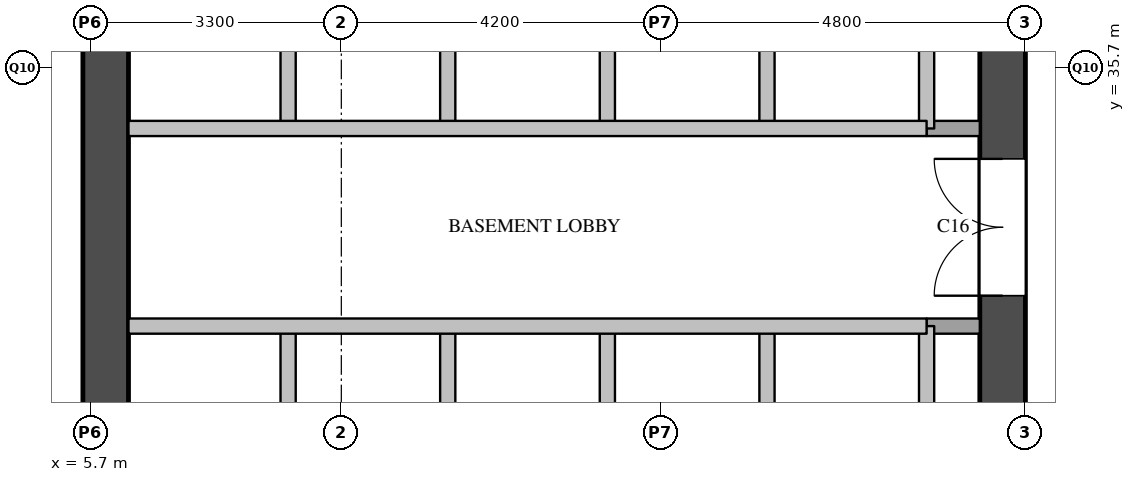
"""IFC4 building model, lengths in metres.
Left out: names, types, materials, properties, quantities, classifications, styles, units other than length and angle.
Written with IfcOpenShell. Run it as: python <this file> out.ifc"""

import sys

from ifc_helpers import new_model, si_unit, direction, frame, frame_2d, origin, place, context, subcontext, project, spatial, rectangle, extrude, element, fill, save


model = new_model("IFC4")
c1 = context("Model", 3, precision=1e-05, world=origin(), true_north=direction((0.0, 1.0)))
c2 = subcontext(c1, "Body", "Model", "MODEL_VIEW")
j1 = project(units=[si_unit("LENGTHUNIT", "METRE"), si_unit("PLANEANGLEUNIT", "RADIAN")], contexts=[c1])
p1 = place(None, origin())
s1 = spatial("IfcSite", under=j1, at=p1, CompositionType="ELEMENT")
p2 = place(p1, origin())
s2 = spatial("IfcBuilding", under=s1, at=p2, CompositionType="ELEMENT")
p3 = place(p2, frame((0.0, 0.0, -6.0)))
s3 = spatial("IfcBuildingStorey", under=s2, at=p3, CompositionType="ELEMENT", Elevation=-6.0)
p4 = place(p3, frame((5.9, 29.1, 0.0), z_axis=(0.0, 0.0, 1.0), x_axis=(0.0, 1.0, 0.0)))
e1 = element("IfcWall", 1, at=p4, inside=s3, PredefinedType="SHEAR", context=c2, shape_type="SweptSolid", body=[
    extrude(rectangle(XDim=20.3, YDim=0.6, at=frame_2d((10.15, 0.0))), origin(), (0.0, 0.0, 1.0), 5.59),
])
p5 = place(p4, frame((16.4, 0.0, 0.0)))
e2 = element("IfcOpeningElement", 2, at=p5, cuts=e1, PredefinedType="OPENING", context=c2, shape_type="SweptSolid", body=[
    extrude(rectangle(XDim=1.0, YDim=2.1, at=frame_2d((0.5, 1.05))), frame((0.0, 0.31, 0.0), z_axis=(0.0, -1.0, 0.0), x_axis=(1.0, 0.0, 0.0)), (0.0, 0.0, 1.0), 0.62),
])
p6 = place(p3, frame((17.7, 29.1, 0.0), z_axis=(0.0, 0.0, 1.0), x_axis=(0.0, 1.0, 0.0)))
e3 = element("IfcWall", 3, at=p6, inside=s3, PredefinedType="SHEAR", context=c2, shape_type="SweptSolid", body=[
    extrude(rectangle(XDim=20.3, YDim=0.6, at=frame_2d((10.15, 0.0))), origin(), (0.0, 0.0, 1.0), 5.59),
])
p7 = place(p6, frame((1.25, 0.0, 0.0)))
e4 = element("IfcOpeningElement", 4, at=p7, cuts=e3, PredefinedType="OPENING", context=c2, shape_type="SweptSolid", body=[
    extrude(rectangle(XDim=0.7, YDim=2.1, at=frame_2d((0.35, 1.05))), frame((0.0, 0.31, 0.0), z_axis=(0.0, -1.0, 0.0), x_axis=(1.0, 0.0, 0.0)), (0.0, 0.0, 1.0), 0.62),
])
p8 = place(p6, frame((7.05, 0.0, 0.0)))
e5 = element("IfcOpeningElement", 5, at=p8, cuts=e3, PredefinedType="OPENING", context=c2, shape_type="SweptSolid", body=[
    extrude(rectangle(XDim=0.7, YDim=2.1, at=frame_2d((0.35, 1.05))), frame((0.0, 0.31, 0.0), z_axis=(0.0, -1.0, 0.0), x_axis=(1.0, 0.0, 0.0)), (0.0, 0.0, 1.0), 0.62),
])
p9 = place(p6, frame((3.6, 0.0, 0.0)))
e6 = element("IfcOpeningElement", 6, at=p9, cuts=e3, PredefinedType="OPENING", context=c2, shape_type="SweptSolid", body=[
    extrude(rectangle(XDim=1.8, YDim=2.1, at=frame_2d((0.9, 1.05))), frame((0.0, 0.31, 0.0), z_axis=(0.0, -1.0, 0.0), x_axis=(1.0, 0.0, 0.0)), (0.0, 0.0, 1.0), 0.62),
])
p10 = place(p6, frame((16.4, 0.0, 0.0)))
e7 = element("IfcOpeningElement", 7, at=p10, cuts=e3, PredefinedType="OPENING", context=c2, shape_type="SweptSolid", body=[
    extrude(rectangle(XDim=1.0, YDim=2.1, at=frame_2d((0.5, 1.05))), frame((0.0, 0.31, 0.0), z_axis=(0.0, -1.0, 0.0), x_axis=(1.0, 0.0, 0.0)), (0.0, 0.0, 1.0), 0.62),
])
p11 = place(p3, frame((8.3, 29.1, 0.0), z_axis=(0.0, 0.0, 1.0), x_axis=(0.0, 1.0, 0.0)))
e8 = element("IfcWall", 8, at=p11, inside=s3, PredefinedType="SOLIDWALL", context=c2, shape_type="SweptSolid", body=[
    extrude(rectangle(XDim=3.2, YDim=0.2, at=frame_2d((1.6, 0.0))), origin(), (0.0, 0.0, 1.0), 5.59),
])
p12 = place(p3, frame((8.3, 34.9, 0.0), z_axis=(0.0, 0.0, 1.0), x_axis=(0.0, 1.0, 0.0)))
e9 = element("IfcWall", 9, at=p12, inside=s3, PredefinedType="SOLIDWALL", context=c2, shape_type="SweptSolid", body=[
    extrude(rectangle(XDim=3.2, YDim=0.2, at=frame_2d((1.6, 0.0))), origin(), (0.0, 0.0, 1.0), 5.59),
])
p13 = place(p3, frame((10.4, 29.1, 0.0), z_axis=(0.0, 0.0, 1.0), x_axis=(0.0, 1.0, 0.0)))
e10 = element("IfcWall", 10, at=p13, inside=s3, PredefinedType="SOLIDWALL", context=c2, shape_type="SweptSolid", body=[
    extrude(rectangle(XDim=3.2, YDim=0.2, at=frame_2d((1.6, 0.0))), origin(), (0.0, 0.0, 1.0), 5.59),
])
p14 = place(p3, frame((10.4, 34.9, 0.0), z_axis=(0.0, 0.0, 1.0), x_axis=(0.0, 1.0, 0.0)))
e11 = element("IfcWall", 11, at=p14, inside=s3, PredefinedType="SOLIDWALL", context=c2, shape_type="SweptSolid", body=[
    extrude(rectangle(XDim=3.2, YDim=0.2, at=frame_2d((1.6, 0.0))), origin(), (0.0, 0.0, 1.0), 5.59),
])
p15 = place(p3, frame((12.5, 29.1, 0.0), z_axis=(0.0, 0.0, 1.0), x_axis=(0.0, 1.0, 0.0)))
e12 = element("IfcWall", 12, at=p15, inside=s3, PredefinedType="SOLIDWALL", context=c2, shape_type="SweptSolid", body=[
    extrude(rectangle(XDim=3.2, YDim=0.2, at=frame_2d((1.6, 0.0))), origin(), (0.0, 0.0, 1.0), 5.59),
])
p16 = place(p3, frame((12.5, 34.9, 0.0), z_axis=(0.0, 0.0, 1.0), x_axis=(0.0, 1.0, 0.0)))
e13 = element("IfcWall", 13, at=p16, inside=s3, PredefinedType="SOLIDWALL", context=c2, shape_type="SweptSolid", body=[
    extrude(rectangle(XDim=3.2, YDim=0.2, at=frame_2d((1.6, 0.0))), origin(), (0.0, 0.0, 1.0), 5.59),
])
p17 = place(p3, frame((14.6, 29.1, 0.0), z_axis=(0.0, 0.0, 1.0), x_axis=(0.0, 1.0, 0.0)))
e14 = element("IfcWall", 14, at=p17, inside=s3, PredefinedType="SOLIDWALL", context=c2, shape_type="SweptSolid", body=[
    extrude(rectangle(XDim=3.2, YDim=0.2, at=frame_2d((1.6, 0.0))), origin(), (0.0, 0.0, 1.0), 5.59),
])
p18 = place(p3, frame((14.6, 34.9, 0.0), z_axis=(0.0, 0.0, 1.0), x_axis=(0.0, 1.0, 0.0)))
e15 = element("IfcWall", 15, at=p18, inside=s3, PredefinedType="SOLIDWALL", context=c2, shape_type="SweptSolid", body=[
    extrude(rectangle(XDim=3.2, YDim=0.2, at=frame_2d((1.6, 0.0))), origin(), (0.0, 0.0, 1.0), 5.59),
])
p19 = place(p3, frame((16.7, 29.1, 0.0), z_axis=(0.0, 0.0, 1.0), x_axis=(0.0, 1.0, 0.0)))
e16 = element("IfcWall", 16, at=p19, inside=s3, PredefinedType="SOLIDWALL", context=c2, shape_type="SweptSolid", body=[
    extrude(rectangle(XDim=3.2, YDim=0.2, at=frame_2d((1.6, 0.0))), origin(), (0.0, 0.0, 1.0), 5.59),
])
p20 = place(p3, frame((16.7, 34.9, 0.0), z_axis=(0.0, 0.0, 1.0), x_axis=(0.0, 1.0, 0.0)))
e17 = element("IfcWall", 17, at=p20, inside=s3, PredefinedType="SOLIDWALL", context=c2, shape_type="SweptSolid", body=[
    extrude(rectangle(XDim=3.2, YDim=0.2, at=frame_2d((1.6, 0.0))), origin(), (0.0, 0.0, 1.0), 5.59),
])
p21 = place(p3, frame((6.2, 32.3, 0.0), z_axis=(0.0, 0.0, 1.0), x_axis=(1.0, 0.0, 0.0)))
e18 = element("IfcWall", 18, at=p21, inside=s3, PredefinedType="SOLIDWALL", context=c2, shape_type="SweptSolid", body=[
    extrude(rectangle(XDim=10.5, YDim=0.2, at=frame_2d((5.25, 0.0))), origin(), (0.0, 0.0, 1.0), 5.59),
])
p22 = place(p3, frame((16.7, 32.3, 0.0), z_axis=(0.0, 0.0, 1.0), x_axis=(1.0, 0.0, 0.0)))
e19 = element("IfcWall", 19, at=p22, inside=s3, PredefinedType="SOLIDWALL", context=c2, shape_type="SweptSolid", body=[
    extrude(rectangle(XDim=0.7, YDim=0.2, at=frame_2d((0.35, 0.0))), origin(), (0.0, 0.0, 1.0), 5.59),
])
p23 = place(p3, frame((6.2, 34.9, 0.0), z_axis=(0.0, 0.0, 1.0), x_axis=(1.0, 0.0, 0.0)))
e20 = element("IfcWall", 20, at=p23, inside=s3, PredefinedType="SOLIDWALL", context=c2, shape_type="SweptSolid", body=[
    extrude(rectangle(XDim=10.5, YDim=0.2, at=frame_2d((5.25, 0.0))), origin(), (0.0, 0.0, 1.0), 5.59),
])
p24 = place(p3, frame((16.7, 34.9, 0.0), z_axis=(0.0, 0.0, 1.0), x_axis=(1.0, 0.0, 0.0)))
e21 = element("IfcWall", 21, at=p24, inside=s3, PredefinedType="SOLIDWALL", context=c2, shape_type="SweptSolid", body=[
    extrude(rectangle(XDim=0.7, YDim=0.2, at=frame_2d((0.35, 0.0))), origin(), (0.0, 0.0, 1.0), 5.59),
])
p25 = place(p9, origin())
e22 = element("IfcDoor", 22, at=p25, inside=s3, OperationType="DOUBLE_DOOR_SINGLE_SWING", PredefinedType="DOOR", context=c2, shape_type="SweptSolid", body=[
    extrude(rectangle(XDim=1.8, YDim=2.1, at=frame_2d((0.9, 1.05))), frame((0.0, 0.025, 0.0), z_axis=(0.0, -1.0, 0.0), x_axis=(1.0, 0.0, 0.0)), (0.0, 0.0, 1.0), 0.05),
])
fill(e6, e22)
save(model, sys.argv[1])
